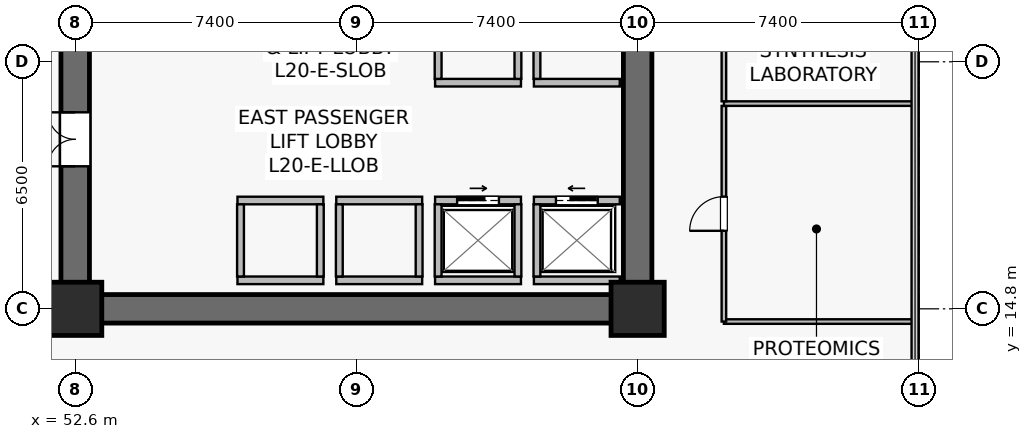
"""IFC4 building model, lengths in metres.
Left out: names, types, materials, properties, quantities, classifications, styles, units other than length and angle.
Written with IfcOpenShell. Run it as: python <this file> out.ifc"""

import sys

from ifc_helpers import new_model, si_unit, direction, frame, frame_2d, origin, origin_2d, place, context, subcontext, project, spatial, rectangle, extrude, source, transform, mapped, element, fill, save


model = new_model("IFC4")
c1 = context("Model", 3, precision=1e-05, world=origin(), true_north=direction((0.0, 1.0)))
c2 = subcontext(c1, "Body", "Model", "MODEL_VIEW")
j1 = project(units=[si_unit("LENGTHUNIT", "METRE"), si_unit("PLANEANGLEUNIT", "RADIAN")], contexts=[c1])
p1 = place(None, origin())
s1 = spatial("IfcSite", under=j1, at=p1, CompositionType="ELEMENT")
p2 = place(p1, origin())
s2 = spatial("IfcBuilding", under=s1, at=p2, CompositionType="ELEMENT")
p3 = place(p2, frame((0.0, 0.0, 82.6)))
s3 = spatial("IfcBuildingStorey", under=s2, at=p3, CompositionType="ELEMENT", Elevation=82.6)
p4 = place(p3, frame((52.225, 14.8, 0.0), z_axis=(0.0, 0.0, 1.0), x_axis=(1.0, 0.0, 0.0)))
e1 = element("IfcWall", 1, at=p4, inside=s3, PredefinedType="SHEAR", context=c2, shape_type="SweptSolid", body=[
    extrude(rectangle(XDim=15.55, YDim=0.75, at=frame_2d((7.775, 0.0))), origin(), (0.0, 0.0, 1.0), 3.78),
])
p5 = place(p3, frame((52.6, 15.175, 0.0), z_axis=(0.0, 0.0, 1.0), x_axis=(0.0, 1.0, 0.0)))
e2 = element("IfcWall", 2, at=p5, inside=s3, PredefinedType="SHEAR", context=c2, shape_type="SweptSolid", body=[
    extrude(rectangle(XDim=18.25, YDim=0.75, at=frame_2d((9.125, 0.0))), origin(), (0.0, 0.0, 1.0), 3.78),
])
p6 = place(p5, frame((3.375, 0.0, 0.0)))
e3 = element("IfcOpeningElement", 3, at=p6, cuts=e2, PredefinedType="OPENING", context=c2, shape_type="SweptSolid", body=[
    extrude(rectangle(XDim=1.42, YDim=2.2, at=frame_2d((0.71, 1.1))), frame((0.0, 0.385, 0.0), z_axis=(0.0, -1.0, 0.0), x_axis=(1.0, 0.0, 0.0)), (0.0, 0.0, 1.0), 0.77),
])
p7 = place(p3, frame((67.4, 15.175, 0.0), z_axis=(0.0, 0.0, 1.0), x_axis=(0.0, 1.0, 0.0)))
e4 = element("IfcWall", 4, at=p7, inside=s3, PredefinedType="SHEAR", context=c2, shape_type="SweptSolid", body=[
    extrude(rectangle(XDim=18.25, YDim=0.75, at=frame_2d((9.125, 0.0))), origin(), (0.0, 0.0, 1.0), 3.78),
])
m1 = source(origin(), c2, "Body", "SweptSolid", [
    extrude(rectangle(XDim=1.4, YDim=1.4, at=origin_2d()), origin(), (0.0, 0.0, 1.0), 4.1),
])
for number, where, z_axis, x_axis in (
    (5, (52.6, 14.8, 0.0), (0.0, 0.0, 1.0), (1.0, 0.0, 0.0)),
    (6, (67.4, 14.8, 0.0), (0.0, 0.0, 1.0), (1.0, 0.0, 0.0)),
):
    element("IfcColumn", number, at=place(p3, frame(where, z_axis=z_axis, x_axis=x_axis)), inside=s3, PredefinedType="COLUMN", context=c2, shape_type="MappedRepresentation", body=[
        mapped(m1, transform((0.0, 0.0, 0.0), scale=1.0)),
    ])
p8 = place(p3, frame((64.67, 17.65, 0.0), z_axis=(0.0, 0.0, 1.0), x_axis=(1.0, 0.0, 0.0)))
e7 = element("IfcWall", 7, at=p8, inside=s3, PredefinedType="SOLIDWALL", context=c2, shape_type="SweptSolid", body=[
    extrude(rectangle(XDim=2.26, YDim=0.2, at=frame_2d((1.13, 0.0))), origin(), (0.0, 0.0, 1.0), 3.78),
])
p9 = place(p8, frame((0.58, 0.0, 0.0)))
e8 = element("IfcOpeningElement", 8, at=p9, cuts=e7, PredefinedType="OPENING", context=c2, shape_type="SweptSolid", body=[
    extrude(rectangle(XDim=1.1, YDim=2.22, at=frame_2d((0.55, 1.11))), frame((0.0, 0.11, 0.0), z_axis=(0.0, -1.0, 0.0), x_axis=(1.0, 0.0, 0.0)), (0.0, 0.0, 1.0), 0.22),
])
p10 = place(p3, frame((64.67, 15.55, 0.0), z_axis=(0.0, 0.0, 1.0), x_axis=(1.0, 0.0, 0.0)))
e9 = element("IfcWall", 9, at=p10, inside=s3, PredefinedType="SOLIDWALL", context=c2, shape_type="SweptSolid", body=[
    extrude(rectangle(XDim=2.26, YDim=0.2, at=frame_2d((1.13, 0.0))), origin(), (0.0, 0.0, 1.0), 3.78),
])
p11 = place(p3, frame((64.75, 15.65, 0.0), z_axis=(0.0, 0.0, 1.0), x_axis=(0.0, 1.0, 0.0)))
e10 = element("IfcWall", 10, at=p11, inside=s3, PredefinedType="SOLIDWALL", context=c2, shape_type="SweptSolid", body=[
    extrude(rectangle(XDim=1.9, YDim=0.18, at=frame_2d((0.95, 0.0))), origin(), (0.0, 0.0, 1.0), 3.78),
])
p12 = place(p3, frame((62.07, 17.65, 0.0), z_axis=(0.0, 0.0, 1.0), x_axis=(1.0, 0.0, 0.0)))
e11 = element("IfcWall", 11, at=p12, inside=s3, PredefinedType="SOLIDWALL", context=c2, shape_type="SweptSolid", body=[
    extrude(rectangle(XDim=2.26, YDim=0.2, at=frame_2d((1.13, 0.0))), origin(), (0.0, 0.0, 1.0), 3.78),
])
p13 = place(p12, frame((0.58, 0.0, 0.0)))
e12 = element("IfcOpeningElement", 12, at=p13, cuts=e11, PredefinedType="OPENING", context=c2, shape_type="SweptSolid", body=[
    extrude(rectangle(XDim=1.1, YDim=2.22, at=frame_2d((0.55, 1.11))), frame((0.0, 0.11, 0.0), z_axis=(0.0, -1.0, 0.0), x_axis=(1.0, 0.0, 0.0)), (0.0, 0.0, 1.0), 0.22),
])
p14 = place(p3, frame((62.07, 15.55, 0.0), z_axis=(0.0, 0.0, 1.0), x_axis=(1.0, 0.0, 0.0)))
e13 = element("IfcWall", 13, at=p14, inside=s3, PredefinedType="SOLIDWALL", context=c2, shape_type="SweptSolid", body=[
    extrude(rectangle(XDim=2.26, YDim=0.2, at=frame_2d((1.13, 0.0))), origin(), (0.0, 0.0, 1.0), 3.78),
])
for number, where, z_axis, x_axis in (
    (14, (62.15, 15.65, 0.0), (0.0, 0.0, 1.0), (0.0, 1.0, 0.0)),
    (15, (64.25, 15.65, 0.0), (0.0, 0.0, 1.0), (0.0, 1.0, 0.0)),
):
    element("IfcWall", number, at=place(p3, frame(where, z_axis=z_axis, x_axis=x_axis)), inside=s3, PredefinedType="SOLIDWALL", context=c2, shape_type="SweptSolid", body=[
        extrude(rectangle(XDim=1.9, YDim=0.18, at=frame_2d((0.95, 0.0))), origin(), (0.0, 0.0, 1.0), 3.78),
    ])
for number, where, z_axis, x_axis in (
    (16, (59.47, 17.65, 0.0), (0.0, 0.0, 1.0), (1.0, 0.0, 0.0)),
    (17, (59.47, 15.55, 0.0), (0.0, 0.0, 1.0), (1.0, 0.0, 0.0)),
):
    element("IfcWall", number, at=place(p3, frame(where, z_axis=z_axis, x_axis=x_axis)), inside=s3, PredefinedType="SOLIDWALL", context=c2, shape_type="SweptSolid", body=[
        extrude(rectangle(XDim=2.26, YDim=0.2, at=frame_2d((1.13, 0.0))), origin(), (0.0, 0.0, 1.0), 3.115),
    ])
for number, where, z_axis, x_axis in (
    (18, (59.55, 15.65, 0.0), (0.0, 0.0, 1.0), (0.0, 1.0, 0.0)),
    (19, (61.65, 15.65, 0.0), (0.0, 0.0, 1.0), (0.0, 1.0, 0.0)),
):
    element("IfcWall", number, at=place(p3, frame(where, z_axis=z_axis, x_axis=x_axis)), inside=s3, PredefinedType="SOLIDWALL", context=c2, shape_type="SweptSolid", body=[
        extrude(rectangle(XDim=1.9, YDim=0.18, at=frame_2d((0.95, 0.0))), origin(), (0.0, 0.0, 1.0), 3.78),
    ])
for number, where, z_axis, x_axis in (
    (20, (56.87, 17.65, 0.0), (0.0, 0.0, 1.0), (1.0, 0.0, 0.0)),
    (21, (56.87, 15.55, 0.0), (0.0, 0.0, 1.0), (1.0, 0.0, 0.0)),
):
    element("IfcWall", number, at=place(p3, frame(where, z_axis=z_axis, x_axis=x_axis)), inside=s3, PredefinedType="SOLIDWALL", context=c2, shape_type="SweptSolid", body=[
        extrude(rectangle(XDim=2.26, YDim=0.2, at=frame_2d((1.13, 0.0))), origin(), (0.0, 0.0, 1.0), 3.78),
    ])
for number, where, z_axis, x_axis in (
    (22, (56.95, 15.65, 0.0), (0.0, 0.0, 1.0), (0.0, 1.0, 0.0)),
    (23, (59.05, 15.65, 0.0), (0.0, 0.0, 1.0), (0.0, 1.0, 0.0)),
):
    element("IfcWall", number, at=place(p3, frame(where, z_axis=z_axis, x_axis=x_axis)), inside=s3, PredefinedType="SOLIDWALL", context=c2, shape_type="SweptSolid", body=[
        extrude(rectangle(XDim=1.9, YDim=0.18, at=frame_2d((0.95, 0.0))), origin(), (0.0, 0.0, 1.0), 3.78),
    ])
p15 = place(p3, frame((64.67, 20.75, 0.0), z_axis=(0.0, 0.0, 1.0), x_axis=(1.0, 0.0, 0.0)))
e24 = element("IfcWall", 24, at=p15, inside=s3, PredefinedType="SOLIDWALL", context=c2, shape_type="SweptSolid", body=[
    extrude(rectangle(XDim=2.26, YDim=0.2, at=frame_2d((1.13, 0.0))), origin(), (0.0, 0.0, 1.0), 3.78),
])
p16 = place(p3, frame((64.75, 20.85, 0.0), z_axis=(0.0, 0.0, 1.0), x_axis=(0.0, 1.0, 0.0)))
e25 = element("IfcWall", 25, at=p16, inside=s3, PredefinedType="SOLIDWALL", context=c2, shape_type="SweptSolid", body=[
    extrude(rectangle(XDim=1.9, YDim=0.18, at=frame_2d((0.95, 0.0))), origin(), (0.0, 0.0, 1.0), 3.78),
])
p17 = place(p3, frame((62.07, 20.75, 0.0), z_axis=(0.0, 0.0, 1.0), x_axis=(1.0, 0.0, 0.0)))
e26 = element("IfcWall", 26, at=p17, inside=s3, PredefinedType="SOLIDWALL", context=c2, shape_type="SweptSolid", body=[
    extrude(rectangle(XDim=2.26, YDim=0.2, at=frame_2d((1.13, 0.0))), origin(), (0.0, 0.0, 1.0), 3.78),
])
for number, where, z_axis, x_axis in (
    (27, (62.15, 20.85, 0.0), (0.0, 0.0, 1.0), (0.0, 1.0, 0.0)),
    (28, (64.25, 20.85, 0.0), (0.0, 0.0, 1.0), (0.0, 1.0, 0.0)),
):
    element("IfcWall", number, at=place(p3, frame(where, z_axis=z_axis, x_axis=x_axis)), inside=s3, PredefinedType="SOLIDWALL", context=c2, shape_type="SweptSolid", body=[
        extrude(rectangle(XDim=1.9, YDim=0.18, at=frame_2d((0.95, 0.0))), origin(), (0.0, 0.0, 1.0), 3.78),
    ])
p18 = place(p3, frame((69.67, 14.465, 0.0), z_axis=(0.0, 0.0, 1.0), x_axis=(1.0, 0.0, 0.0)))
e29 = element("IfcWall", 29, at=p18, inside=s3, PredefinedType="PARTITIONING", context=c2, shape_type="SweptSolid", body=[
    extrude(rectangle(XDim=5.02, YDim=0.12, at=frame_2d((2.51, 0.0))), origin(), (0.0, 0.0, 1.0), 3.78),
])
p19 = place(p3, frame((69.67, 14.465, 0.0), z_axis=(0.0, 0.0, 1.0), x_axis=(0.0, 1.0, 0.0)))
e30 = element("IfcWall", 30, at=p19, inside=s3, PredefinedType="PARTITIONING", context=c2, shape_type="SweptSolid", body=[
    extrude(rectangle(XDim=5.675, YDim=0.12, at=frame_2d((2.837, 0.0))), origin(), (0.0, 0.0, 1.0), 3.78),
])
p20 = place(p19, frame((2.387, 0.0, 0.0)))
e31 = element("IfcOpeningElement", 31, at=p20, cuts=e30, PredefinedType="OPENING", context=c2, shape_type="SweptSolid", body=[
    extrude(rectangle(XDim=0.9, YDim=2.1, at=frame_2d((0.45, 1.05))), frame((0.0, 0.07, 0.0), z_axis=(0.0, -1.0, 0.0), x_axis=(1.0, 0.0, 0.0)), (0.0, 0.0, 1.0), 0.14),
])
p21 = place(p3, frame((69.67, 20.2, 0.0), z_axis=(0.0, 0.0, 1.0), x_axis=(1.0, 0.0, 0.0)))
e32 = element("IfcWall", 32, at=p21, inside=s3, PredefinedType="PARTITIONING", context=c2, shape_type="SweptSolid", body=[
    extrude(rectangle(XDim=5.02, YDim=0.12, at=frame_2d((2.51, 0.0))), origin(), (0.0, 0.0, 1.0), 3.78),
])
p22 = place(p3, frame((69.67, 20.26, 0.0), z_axis=(0.0, 0.0, 1.0), x_axis=(0.0, 1.0, 0.0)))
e33 = element("IfcWall", 33, at=p22, inside=s3, PredefinedType="PARTITIONING", context=c2, shape_type="SweptSolid", body=[
    extrude(rectangle(XDim=7.48, YDim=0.12, at=frame_2d((3.74, 0.0))), origin(), (0.0, 0.0, 1.0), 3.78),
])
p23 = place(p22, frame((3.29, 0.0, 0.0)))
e34 = element("IfcOpeningElement", 34, at=p23, cuts=e33, PredefinedType="OPENING", context=c2, shape_type="SweptSolid", body=[
    extrude(rectangle(XDim=0.9, YDim=2.1, at=frame_2d((0.45, 1.05))), frame((0.0, 0.07, 0.0), z_axis=(0.0, -1.0, 0.0), x_axis=(1.0, 0.0, 0.0)), (0.0, 0.0, 1.0), 0.14),
])
m2 = source(origin(), c2, "Body", "SweptSolid", [
    extrude(rectangle(XDim=1.1, YDim=2.22, at=frame_2d((0.55, 1.11))), frame((0.0, 0.025, 0.0), z_axis=(0.0, -1.0, 0.0), x_axis=(1.0, 0.0, 0.0)), (0.0, 0.0, 1.0), 0.05),
])
p24 = place(p9, origin())
e35 = element("IfcDoor", 35, at=p24, inside=s3, OperationType="SLIDING_TO_LEFT", PredefinedType="USERDEFINED", context=c2, shape_type="MappedRepresentation", body=[
    mapped(m2, transform((0.0, 0.0, 0.0), scale=1.0)),
])
fill(e8, e35)
p25 = place(p13, origin())
e36 = element("IfcDoor", 36, at=p25, inside=s3, OperationType="SLIDING_TO_RIGHT", PredefinedType="USERDEFINED", context=c2, shape_type="MappedRepresentation", body=[
    mapped(m2, transform((0.0, 0.0, 0.0), scale=1.0)),
])
fill(e12, e36)
m3 = source(origin(), c2, "Body", "SweptSolid", [
    extrude(rectangle(XDim=1.42, YDim=2.2, at=frame_2d((0.71, 1.1))), frame((0.0, 0.025, 0.0), z_axis=(0.0, -1.0, 0.0), x_axis=(1.0, 0.0, 0.0)), (0.0, 0.0, 1.0), 0.05),
])
p26 = place(p6, origin())
e37 = element("IfcDoor", 37, at=p26, inside=s3, OperationType="DOUBLE_DOOR_SINGLE_SWING", PredefinedType="DOOR", context=c2, shape_type="MappedRepresentation", body=[
    mapped(m3, transform((0.0, 0.0, 0.0), scale=1.0)),
])
fill(e3, e37)
m4 = source(origin(), c2, "Body", "SweptSolid", [
    extrude(rectangle(XDim=0.9, YDim=2.1, at=frame_2d((0.45, 1.05))), frame((0.0, 0.025, 0.0), z_axis=(0.0, -1.0, 0.0), x_axis=(1.0, 0.0, 0.0)), (0.0, 0.0, 1.0), 0.05),
])
p27 = place(p20, origin())
e38 = element("IfcDoor", 38, at=p27, inside=s3, OperationType="SINGLE_SWING_LEFT", PredefinedType="DOOR", context=c2, shape_type="MappedRepresentation", body=[
    mapped(m4, transform((0.0, 0.0, 0.0), scale=1.0)),
])
fill(e31, e38)
save(model, sys.argv[1])
